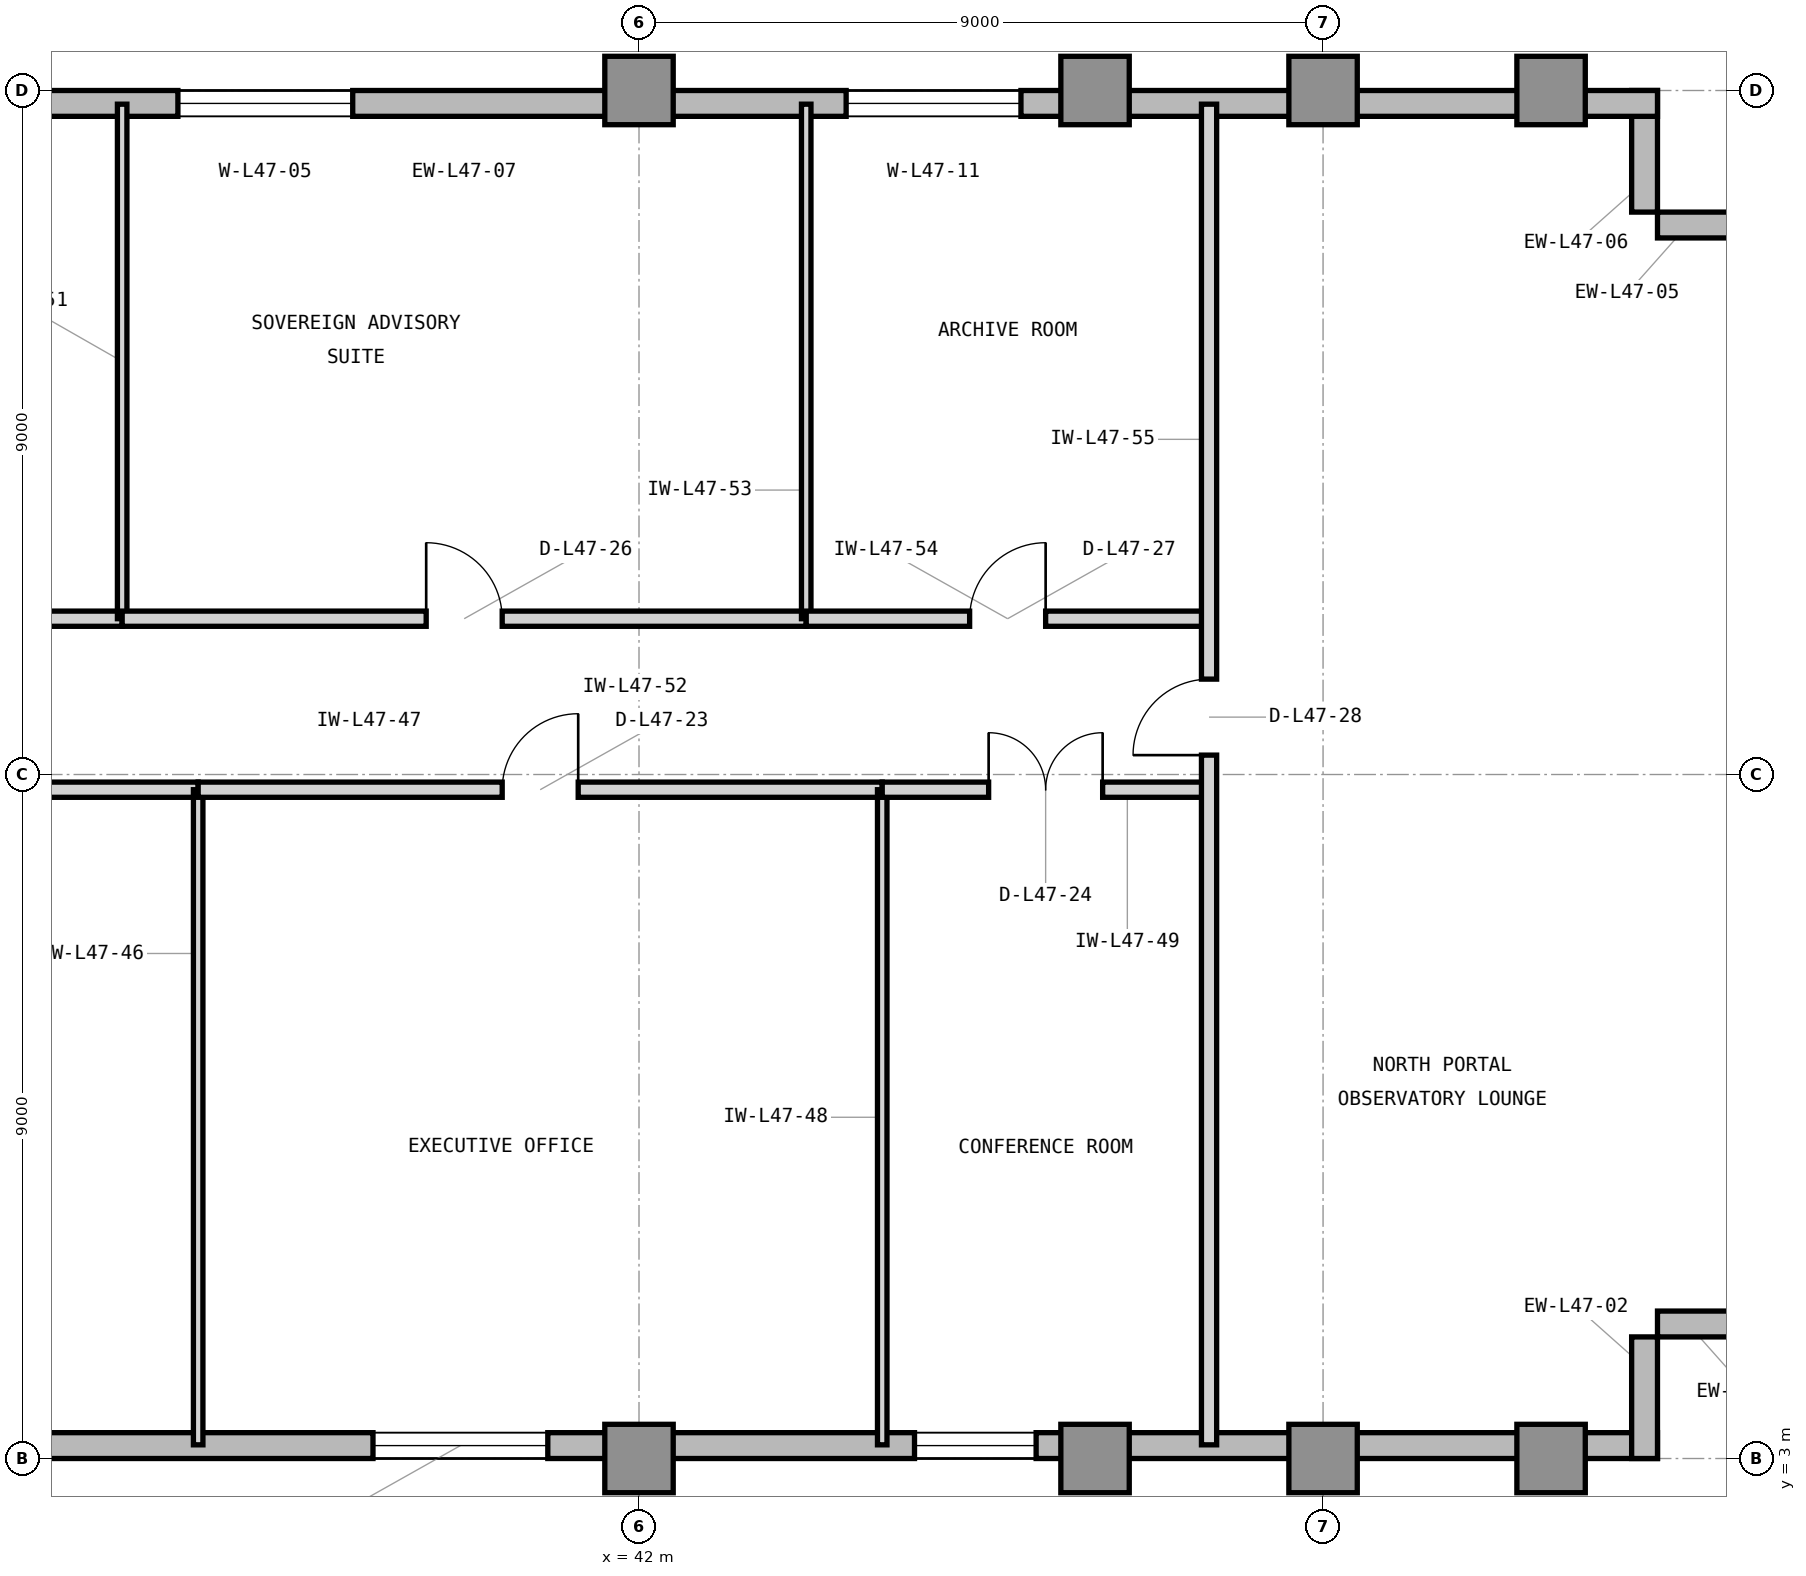
"""IFC4 building model, lengths in metres.
Left out: names, types, materials, properties, quantities, classifications, styles, units other than length and angle.
Written with IfcOpenShell. Run it as: python <this file> out.ifc"""

import sys

from ifc_helpers import new_model, si_unit, direction, frame, frame_2d, origin, origin_2d, place, context, subcontext, project, spatial, rectangle, extrude, element, fill, save


model = new_model("IFC4")
c1 = context("Model", 3, precision=1e-05, world=origin(), true_north=direction((0.0, 1.0)))
c2 = subcontext(c1, "Body", "Model", "MODEL_VIEW")
j1 = project(units=[si_unit("LENGTHUNIT", "METRE"), si_unit("PLANEANGLEUNIT", "RADIAN")], contexts=[c1])
p1 = place(None, origin())
s1 = spatial("IfcSite", under=j1, at=p1, CompositionType="ELEMENT")
p2 = place(p1, origin())
s2 = spatial("IfcBuilding", under=s1, at=p2, CompositionType="ELEMENT")
p3 = place(p2, frame((0.0, 0.0, 195.6)))
s3 = spatial("IfcBuildingStorey", under=s2, at=p3, CompositionType="ELEMENT", Elevation=195.6)
for number, where, z_axis, x_axis in (
    (1, (42.0, 3.0, 0.0), (0.0, 0.0, 1.0), (1.0, 0.0, 0.0)),
    (2, (42.0, 21.0, 0.0), (0.0, 0.0, 1.0), (1.0, 0.0, 0.0)),
    (3, (48.0, 3.0, 0.0), (0.0, 0.0, 1.0), (1.0, 0.0, 0.0)),
    (4, (48.0, 21.0, 0.0), (0.0, 0.0, 1.0), (1.0, 0.0, 0.0)),
    (5, (51.0, 3.0, 0.0), (0.0, 0.0, 1.0), (1.0, 0.0, 0.0)),
    (6, (51.0, 21.0, 0.0), (0.0, 0.0, 1.0), (1.0, 0.0, 0.0)),
    (7, (54.0, 3.0, 0.0), (0.0, 0.0, 1.0), (1.0, 0.0, 0.0)),
    (8, (54.0, 21.0, 0.0), (0.0, 0.0, 1.0), (1.0, 0.0, 0.0)),
):
    element("IfcColumn", number, at=place(p3, frame(where, z_axis=z_axis, x_axis=x_axis)), inside=s3, PredefinedType="COLUMN", context=c2, shape_type="SweptSolid", body=[
        extrude(rectangle(XDim=0.9, YDim=0.9, at=origin_2d()), origin(), (0.0, 0.0, 1.0), 3.9),
    ])
p4 = place(p3, frame((23.9, 3.17, 0.0), z_axis=(0.0, 0.0, 1.0), x_axis=(1.0, 0.0, 0.0)))
e9 = element("IfcWall", 9, at=p4, inside=s3, PredefinedType="STANDARD", context=c2, shape_type="SweptSolid", body=[
    extrude(rectangle(XDim=31.5, YDim=0.34, at=frame_2d((15.75, 0.0))), origin(), (0.0, 0.0, 1.0), 3.7),
])
p5 = place(p4, frame((5.6, 0.0, 0.9)))
e10 = element("IfcOpeningElement", 10, at=p5, cuts=e9, PredefinedType="OPENING", context=c2, shape_type="SweptSolid", body=[
    extrude(rectangle(XDim=2.3, YDim=2.2, at=frame_2d((1.15, 1.1))), frame((0.0, 0.18, 0.0), z_axis=(0.0, -1.0, 0.0), x_axis=(1.0, 0.0, 0.0)), (0.0, 0.0, 1.0), 0.36),
])
p6 = place(p4, frame((14.6, 0.0, 0.9)))
e11 = element("IfcOpeningElement", 11, at=p6, cuts=e9, PredefinedType="OPENING", context=c2, shape_type="SweptSolid", body=[
    extrude(rectangle(XDim=2.3, YDim=2.2, at=frame_2d((1.15, 1.1))), frame((0.0, 0.18, 0.0), z_axis=(0.0, -1.0, 0.0), x_axis=(1.0, 0.0, 0.0)), (0.0, 0.0, 1.0), 0.36),
])
p7 = place(p4, frame((0.9, 0.0, 0.9)))
e12 = element("IfcOpeningElement", 12, at=p7, cuts=e9, PredefinedType="OPENING", context=c2, shape_type="SweptSolid", body=[
    extrude(rectangle(XDim=1.6, YDim=2.2, at=frame_2d((0.8, 1.1))), frame((0.0, 0.18, 0.0), z_axis=(0.0, -1.0, 0.0), x_axis=(1.0, 0.0, 0.0)), (0.0, 0.0, 1.0), 0.36),
])
p8 = place(p4, frame((21.725, 0.0, 0.9)))
e13 = element("IfcOpeningElement", 13, at=p8, cuts=e9, PredefinedType="OPENING", context=c2, shape_type="SweptSolid", body=[
    extrude(rectangle(XDim=1.6, YDim=2.2, at=frame_2d((0.8, 1.1))), frame((0.0, 0.18, 0.0), z_axis=(0.0, -1.0, 0.0), x_axis=(1.0, 0.0, 0.0)), (0.0, 0.0, 1.0), 0.36),
])
for number, where, z_axis, x_axis in (
    (14, (55.23, 3.0, 0.0), (0.0, 0.0, 1.0), (0.0, 1.0, 0.0)),
    (15, (55.4, 4.77, 0.0), (0.0, 0.0, 1.0), (1.0, 0.0, 0.0)),
    (16, (57.0, 19.23, 0.0), (0.0, 0.0, 1.0), (-1.0, 0.0, 0.0)),
    (17, (55.23, 19.4, 0.0), (0.0, 0.0, 1.0), (0.0, 1.0, 0.0)),
):
    element("IfcWall", number, at=place(p3, frame(where, z_axis=z_axis, x_axis=x_axis)), inside=s3, PredefinedType="STANDARD", context=c2, shape_type="SweptSolid", body=[
        extrude(rectangle(XDim=1.6, YDim=0.34, at=frame_2d((0.8, 0.0))), origin(), (0.0, 0.0, 1.0), 3.7),
    ])
p9 = place(p3, frame((55.4, 20.83, 0.0), z_axis=(0.0, 0.0, 1.0), x_axis=(-1.0, 0.0, 0.0)))
e18 = element("IfcWall", 18, at=p9, inside=s3, PredefinedType="STANDARD", context=c2, shape_type="SweptSolid", body=[
    extrude(rectangle(XDim=31.4, YDim=0.34, at=frame_2d((15.7, 0.0))), origin(), (0.0, 0.0, 1.0), 3.7),
])
p10 = place(p9, frame((17.167, 0.0, 0.9)))
e19 = element("IfcOpeningElement", 19, at=p10, cuts=e18, PredefinedType="OPENING", context=c2, shape_type="SweptSolid", body=[
    extrude(rectangle(XDim=2.3, YDim=2.2, at=frame_2d((1.15, 1.1))), frame((0.0, 0.18, 0.0), z_axis=(0.0, -1.0, 0.0), x_axis=(1.0, 0.0, 0.0)), (0.0, 0.0, 1.0), 0.36),
])
p11 = place(p9, frame((29.046, 0.0, 0.9)))
e20 = element("IfcOpeningElement", 20, at=p11, cuts=e18, PredefinedType="OPENING", context=c2, shape_type="SweptSolid", body=[
    extrude(rectangle(XDim=1.6, YDim=2.2, at=frame_2d((0.8, 1.1))), frame((0.0, 0.18, 0.0), z_axis=(0.0, -1.0, 0.0), x_axis=(1.0, 0.0, 0.0)), (0.0, 0.0, 1.0), 0.36),
])
p12 = place(p9, frame((8.375, 0.0, 0.9)))
e21 = element("IfcOpeningElement", 21, at=p12, cuts=e18, PredefinedType="OPENING", context=c2, shape_type="SweptSolid", body=[
    extrude(rectangle(XDim=2.3, YDim=2.2, at=frame_2d((1.15, 1.1))), frame((0.0, 0.18, 0.0), z_axis=(0.0, -1.0, 0.0), x_axis=(1.0, 0.0, 0.0)), (0.0, 0.0, 1.0), 0.36),
])
p13 = place(p3, frame((26.7, 11.8, 0.0), z_axis=(0.0, 0.0, 1.0), x_axis=(1.0, 0.0, 0.0)))
e22 = element("IfcWall", 22, at=p13, inside=s3, PredefinedType="PARTITIONING", context=c2, shape_type="SweptSolid", body=[
    extrude(rectangle(XDim=9.5, YDim=0.2, at=frame_2d((4.75, 0.0))), origin(), (0.0, 0.0, 1.0), 3.69),
])
p14 = place(p13, frame((4.25, 0.0, 0.0)))
e23 = element("IfcOpeningElement", 23, at=p14, cuts=e22, PredefinedType="OPENING", context=c2, shape_type="SweptSolid", body=[
    extrude(rectangle(XDim=1.0, YDim=2.15, at=frame_2d((0.5, 1.075))), frame((0.0, 0.11, 0.0), z_axis=(0.0, -1.0, 0.0), x_axis=(1.0, 0.0, 0.0)), (0.0, 0.0, 1.0), 0.22),
])
p15 = place(p3, frame((36.2, 3.18, 0.0), z_axis=(0.0, 0.0, 1.0), x_axis=(0.0, 1.0, 0.0)))
e24 = element("IfcWall", 24, at=p15, inside=s3, PredefinedType="PARTITIONING", context=c2, shape_type="SweptSolid", body=[
    extrude(rectangle(XDim=8.62, YDim=0.125, at=frame_2d((4.31, 0.0))), origin(), (0.0, 0.0, 1.0), 3.69),
])
p16 = place(p3, frame((36.2, 11.8, 0.0), z_axis=(0.0, 0.0, 1.0), x_axis=(1.0, 0.0, 0.0)))
e25 = element("IfcWall", 25, at=p16, inside=s3, PredefinedType="PARTITIONING", context=c2, shape_type="SweptSolid", body=[
    extrude(rectangle(XDim=9.0, YDim=0.2, at=frame_2d((4.5, 0.0))), origin(), (0.0, 0.0, 1.0), 3.69),
])
p17 = place(p16, frame((4.0, 0.0, 0.0)))
e26 = element("IfcOpeningElement", 26, at=p17, cuts=e25, PredefinedType="OPENING", context=c2, shape_type="SweptSolid", body=[
    extrude(rectangle(XDim=1.0, YDim=2.15, at=frame_2d((0.5, 1.075))), frame((0.0, 0.11, 0.0), z_axis=(0.0, -1.0, 0.0), x_axis=(1.0, 0.0, 0.0)), (0.0, 0.0, 1.0), 0.22),
])
p18 = place(p3, frame((45.2, 3.18, 0.0), z_axis=(0.0, 0.0, 1.0), x_axis=(0.0, 1.0, 0.0)))
e27 = element("IfcWall", 27, at=p18, inside=s3, PredefinedType="PARTITIONING", context=c2, shape_type="SweptSolid", body=[
    extrude(rectangle(XDim=8.62, YDim=0.125, at=frame_2d((4.31, 0.0))), origin(), (0.0, 0.0, 1.0), 3.69),
])
p19 = place(p3, frame((45.2, 11.8, 0.0), z_axis=(0.0, 0.0, 1.0), x_axis=(1.0, 0.0, 0.0)))
e28 = element("IfcWall", 28, at=p19, inside=s3, PredefinedType="PARTITIONING", context=c2, shape_type="SweptSolid", body=[
    extrude(rectangle(XDim=4.3, YDim=0.2, at=frame_2d((2.15, 0.0))), origin(), (0.0, 0.0, 1.0), 3.69),
])
p20 = place(p19, frame((1.4, 0.0, 0.0)))
e29 = element("IfcOpeningElement", 29, at=p20, cuts=e28, PredefinedType="OPENING", context=c2, shape_type="SweptSolid", body=[
    extrude(rectangle(XDim=1.5, YDim=2.3, at=frame_2d((0.75, 1.15))), frame((0.0, 0.11, 0.0), z_axis=(0.0, -1.0, 0.0), x_axis=(1.0, 0.0, 0.0)), (0.0, 0.0, 1.0), 0.22),
])
p21 = place(p3, frame((26.7, 14.05, 0.0), z_axis=(0.0, 0.0, 1.0), x_axis=(1.0, 0.0, 0.0)))
e30 = element("IfcWall", 30, at=p21, inside=s3, PredefinedType="PARTITIONING", context=c2, shape_type="SweptSolid", body=[
    extrude(rectangle(XDim=8.5, YDim=0.2, at=frame_2d((4.25, 0.0))), origin(), (0.0, 0.0, 1.0), 3.69),
])
p22 = place(p21, frame((3.5, 0.0, 0.0)))
e31 = element("IfcOpeningElement", 31, at=p22, cuts=e30, PredefinedType="OPENING", context=c2, shape_type="SweptSolid", body=[
    extrude(rectangle(XDim=1.5, YDim=2.3, at=frame_2d((0.75, 1.15))), frame((0.0, 0.11, 0.0), z_axis=(0.0, -1.0, 0.0), x_axis=(1.0, 0.0, 0.0)), (0.0, 0.0, 1.0), 0.22),
])
p23 = place(p3, frame((35.2, 14.05, 0.0), z_axis=(0.0, 0.0, 1.0), x_axis=(0.0, 1.0, 0.0)))
e32 = element("IfcWall", 32, at=p23, inside=s3, PredefinedType="PARTITIONING", context=c2, shape_type="SweptSolid", body=[
    extrude(rectangle(XDim=6.77, YDim=0.125, at=frame_2d((3.385, 0.0))), origin(), (0.0, 0.0, 1.0), 3.69),
])
p24 = place(p3, frame((35.2, 14.05, 0.0), z_axis=(0.0, 0.0, 1.0), x_axis=(1.0, 0.0, 0.0)))
e33 = element("IfcWall", 33, at=p24, inside=s3, PredefinedType="PARTITIONING", context=c2, shape_type="SweptSolid", body=[
    extrude(rectangle(XDim=9.0, YDim=0.2, at=frame_2d((4.5, 0.0))), origin(), (0.0, 0.0, 1.0), 3.69),
])
p25 = place(p24, frame((4.0, 0.0, 0.0)))
e34 = element("IfcOpeningElement", 34, at=p25, cuts=e33, PredefinedType="OPENING", context=c2, shape_type="SweptSolid", body=[
    extrude(rectangle(XDim=1.0, YDim=2.15, at=frame_2d((0.5, 1.075))), frame((0.0, 0.11, 0.0), z_axis=(0.0, -1.0, 0.0), x_axis=(1.0, 0.0, 0.0)), (0.0, 0.0, 1.0), 0.22),
])
p26 = place(p3, frame((44.2, 14.05, 0.0), z_axis=(0.0, 0.0, 1.0), x_axis=(0.0, 1.0, 0.0)))
e35 = element("IfcWall", 35, at=p26, inside=s3, PredefinedType="PARTITIONING", context=c2, shape_type="SweptSolid", body=[
    extrude(rectangle(XDim=6.77, YDim=0.125, at=frame_2d((3.385, 0.0))), origin(), (0.0, 0.0, 1.0), 3.69),
])
p27 = place(p3, frame((44.2, 14.05, 0.0), z_axis=(0.0, 0.0, 1.0), x_axis=(1.0, 0.0, 0.0)))
e36 = element("IfcWall", 36, at=p27, inside=s3, PredefinedType="PARTITIONING", context=c2, shape_type="SweptSolid", body=[
    extrude(rectangle(XDim=5.3, YDim=0.2, at=frame_2d((2.65, 0.0))), origin(), (0.0, 0.0, 1.0), 3.69),
])
p28 = place(p27, frame((2.15, 0.0, 0.0)))
e37 = element("IfcOpeningElement", 37, at=p28, cuts=e36, PredefinedType="OPENING", context=c2, shape_type="SweptSolid", body=[
    extrude(rectangle(XDim=1.0, YDim=2.15, at=frame_2d((0.5, 1.075))), frame((0.0, 0.11, 0.0), z_axis=(0.0, -1.0, 0.0), x_axis=(1.0, 0.0, 0.0)), (0.0, 0.0, 1.0), 0.22),
])
p29 = place(p3, frame((49.5, 3.18, 0.0), z_axis=(0.0, 0.0, 1.0), x_axis=(0.0, 1.0, 0.0)))
e38 = element("IfcWall", 38, at=p29, inside=s3, PredefinedType="PARTITIONING", context=c2, shape_type="SweptSolid", body=[
    extrude(rectangle(XDim=17.64, YDim=0.2, at=frame_2d((8.82, 0.0))), origin(), (0.0, 0.0, 1.0), 3.69),
])
p30 = place(p29, frame((9.075, 0.0, 0.0)))
e39 = element("IfcOpeningElement", 39, at=p30, cuts=e38, PredefinedType="OPENING", context=c2, shape_type="SweptSolid", body=[
    extrude(rectangle(XDim=1.0, YDim=2.15, at=frame_2d((0.5, 1.075))), frame((0.0, 0.11, 0.0), z_axis=(0.0, -1.0, 0.0), x_axis=(1.0, 0.0, 0.0)), (0.0, 0.0, 1.0), 0.22),
])
p31 = place(p6, origin())
e40 = element("IfcWindow", 40, at=p31, inside=s3, PartitioningType="SINGLE_PANEL", PredefinedType="WINDOW", context=c2, shape_type="SweptSolid", body=[
    extrude(rectangle(XDim=2.3, YDim=2.2, at=frame_2d((1.15, 1.1))), frame((0.0, 0.11, 0.0), z_axis=(0.0, -1.0, 0.0), x_axis=(1.0, 0.0, 0.0)), (0.0, 0.0, 1.0), 0.06),
])
fill(e11, e40)
p32 = place(p10, origin())
e41 = element("IfcWindow", 41, at=p32, inside=s3, PartitioningType="SINGLE_PANEL", PredefinedType="WINDOW", context=c2, shape_type="SweptSolid", body=[
    extrude(rectangle(XDim=2.3, YDim=2.2, at=frame_2d((1.15, 1.1))), frame((0.0, 0.11, 0.0), z_axis=(0.0, -1.0, 0.0), x_axis=(1.0, 0.0, 0.0)), (0.0, 0.0, 1.0), 0.06),
])
fill(e19, e41)
p33 = place(p17, origin())
e42 = element("IfcDoor", 42, at=p33, inside=s3, OperationType="SINGLE_SWING_RIGHT", PredefinedType="DOOR", context=c2, shape_type="SweptSolid", body=[
    extrude(rectangle(XDim=1.0, YDim=2.15, at=frame_2d((0.5, 1.075))), frame((0.0, 0.025, 0.0), z_axis=(0.0, -1.0, 0.0), x_axis=(1.0, 0.0, 0.0)), (0.0, 0.0, 1.0), 0.05),
])
fill(e26, e42)
p34 = place(p20, origin())
e43 = element("IfcDoor", 43, at=p34, inside=s3, OperationType="DOUBLE_DOOR_SINGLE_SWING", PredefinedType="DOOR", context=c2, shape_type="SweptSolid", body=[
    extrude(rectangle(XDim=1.5, YDim=2.3, at=frame_2d((0.75, 1.15))), frame((0.0, 0.025, 0.0), z_axis=(0.0, -1.0, 0.0), x_axis=(1.0, 0.0, 0.0)), (0.0, 0.0, 1.0), 0.05),
])
fill(e29, e43)
p35 = place(p25, origin())
e44 = element("IfcDoor", 44, at=p35, inside=s3, OperationType="SINGLE_SWING_LEFT", PredefinedType="DOOR", context=c2, shape_type="SweptSolid", body=[
    extrude(rectangle(XDim=1.0, YDim=2.15, at=frame_2d((0.5, 1.075))), frame((0.0, 0.025, 0.0), z_axis=(0.0, -1.0, 0.0), x_axis=(1.0, 0.0, 0.0)), (0.0, 0.0, 1.0), 0.05),
])
fill(e34, e44)
p36 = place(p28, origin())
e45 = element("IfcDoor", 45, at=p36, inside=s3, OperationType="SINGLE_SWING_RIGHT", PredefinedType="DOOR", context=c2, shape_type="SweptSolid", body=[
    extrude(rectangle(XDim=1.0, YDim=2.15, at=frame_2d((0.5, 1.075))), frame((0.0, 0.025, 0.0), z_axis=(0.0, -1.0, 0.0), x_axis=(1.0, 0.0, 0.0)), (0.0, 0.0, 1.0), 0.05),
])
fill(e37, e45)
p37 = place(p30, origin())
e46 = element("IfcDoor", 46, at=p37, inside=s3, OperationType="SINGLE_SWING_LEFT", PredefinedType="DOOR", context=c2, shape_type="SweptSolid", body=[
    extrude(rectangle(XDim=1.0, YDim=2.15, at=frame_2d((0.5, 1.075))), frame((0.0, 0.025, 0.0), z_axis=(0.0, -1.0, 0.0), x_axis=(1.0, 0.0, 0.0)), (0.0, 0.0, 1.0), 0.05),
])
fill(e39, e46)
p38 = place(p8, origin())
e47 = element("IfcWindow", 47, at=p38, inside=s3, PartitioningType="SINGLE_PANEL", PredefinedType="WINDOW", context=c2, shape_type="SweptSolid", body=[
    extrude(rectangle(XDim=1.6, YDim=2.2, at=frame_2d((0.8, 1.1))), frame((0.0, 0.11, 0.0), z_axis=(0.0, -1.0, 0.0), x_axis=(1.0, 0.0, 0.0)), (0.0, 0.0, 1.0), 0.06),
])
fill(e13, e47)
p39 = place(p12, origin())
e48 = element("IfcWindow", 48, at=p39, inside=s3, PartitioningType="SINGLE_PANEL", PredefinedType="WINDOW", context=c2, shape_type="SweptSolid", body=[
    extrude(rectangle(XDim=2.3, YDim=2.2, at=frame_2d((1.15, 1.1))), frame((0.0, 0.11, 0.0), z_axis=(0.0, -1.0, 0.0), x_axis=(1.0, 0.0, 0.0)), (0.0, 0.0, 1.0), 0.06),
])
fill(e21, e48)
save(model, sys.argv[1])
